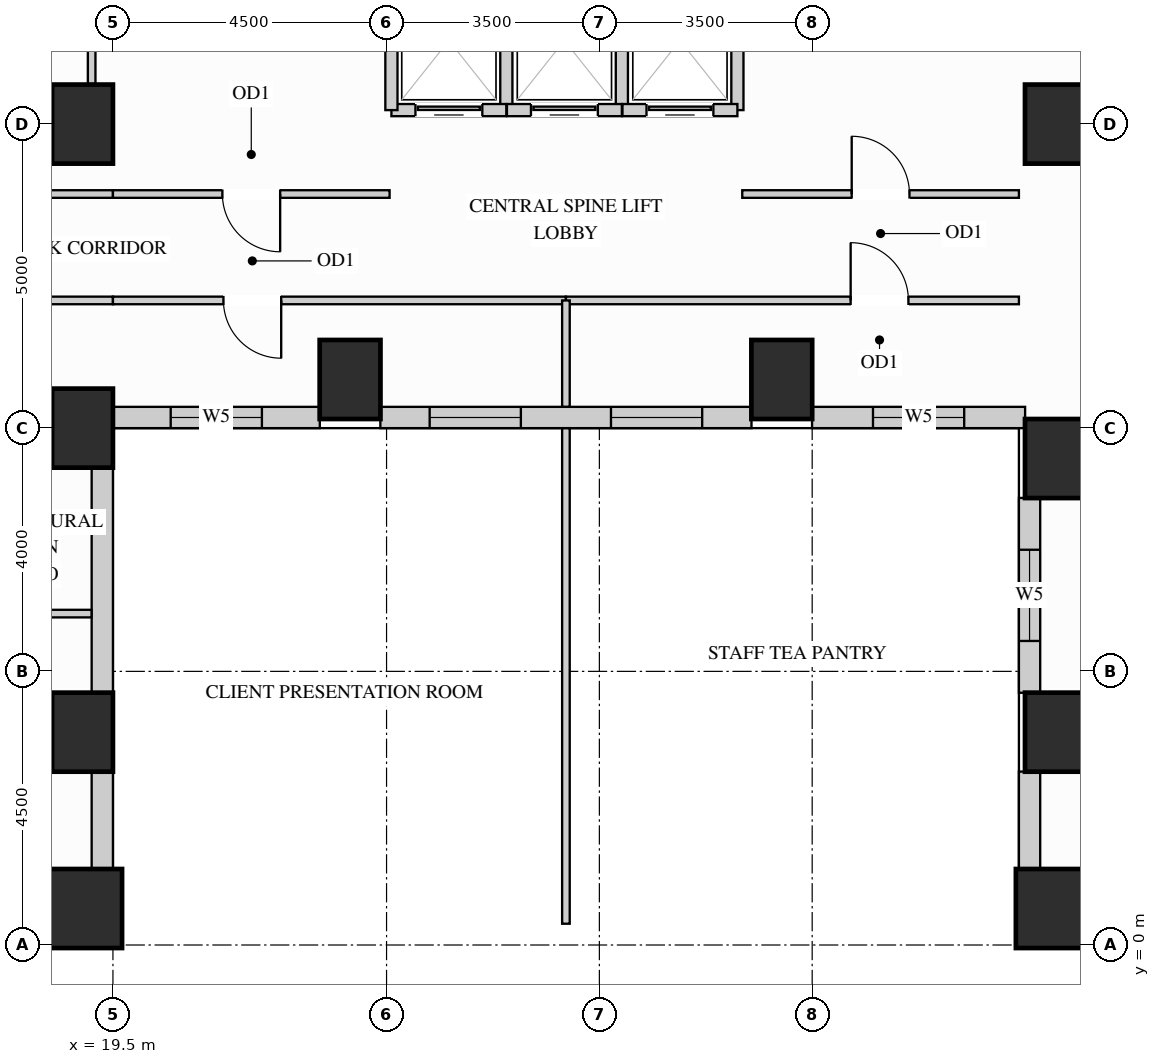
"""IFC4 building model, lengths in metres.
Left out: names, types, materials, properties, quantities, classifications, styles, units other than length and angle.
Written with IfcOpenShell. Run it as: python <this file> out.ifc"""

import sys

from ifc_helpers import new_model, si_unit, direction, frame, frame_2d, origin, origin_2d, place, context, subcontext, project, spatial, rectangle, extrude, source, transform, mapped, element, fill, save


model = new_model("IFC4")
c1 = context("Model", 3, precision=1e-05, world=origin(), true_north=direction((0.0, 1.0)))
c2 = subcontext(c1, "Body", "Model", "MODEL_VIEW")
j1 = project(units=[si_unit("LENGTHUNIT", "METRE"), si_unit("PLANEANGLEUNIT", "RADIAN")], contexts=[c1])
p1 = place(None, origin())
s1 = spatial("IfcSite", under=j1, at=p1, CompositionType="ELEMENT")
p2 = place(p1, origin())
s2 = spatial("IfcBuilding", under=s1, at=p2, CompositionType="ELEMENT")
p3 = place(p2, frame((0.0, 0.0, 26.1)))
s3 = spatial("IfcBuildingStorey", under=s2, at=p3, CompositionType="ELEMENT", Elevation=26.1)
m1 = source(origin(), c2, "Body", "SweptSolid", [
    extrude(rectangle(XDim=1.0, YDim=1.3, at=origin_2d()), origin(), (0.0, 0.0, 1.0), 3.38),
])
for number, where, z_axis, x_axis in (
    (1, (19.0, 13.5, 0.0), (0.0, 0.0, 1.0), (1.0, 0.0, 0.0)),
    (2, (19.0, 3.5, 0.0), (0.0, 0.0, 1.0), (1.0, 0.0, 0.0)),
    (3, (19.0, 8.5, 0.0), (0.0, 0.0, 1.0), (1.0, 0.0, 0.0)),
    (4, (35.0, 13.5, 0.0), (0.0, 0.0, 1.0), (1.0, 0.0, 0.0)),
    (5, (35.0, 3.5, 0.0), (0.0, 0.0, 1.0), (1.0, 0.0, 0.0)),
    (6, (35.0, 8.0, 0.0), (0.0, 0.0, 1.0), (1.0, 0.0, 0.0)),
    (7, (23.4, 9.3, 0.0), (0.0, 0.0, 1.0), (1.0, 0.0, 0.0)),
    (8, (30.5, 9.3, 0.0), (0.0, 0.0, 1.0), (1.0, 0.0, 0.0)),
):
    element("IfcColumn", number, at=place(p3, frame(where, z_axis=z_axis, x_axis=x_axis)), inside=s3, PredefinedType="COLUMN", context=c2, shape_type="MappedRepresentation", body=[
        mapped(m1, transform((0.0, 0.0, 0.0), x_axis=(1.0, 0.0, 0.0), y_axis=(0.0, 1.0, 0.0), z_axis=(0.0, 0.0, 1.0))),
    ])
m2 = source(origin(), c2, "Body", "SweptSolid", [
    extrude(rectangle(XDim=1.3, YDim=1.3, at=origin_2d()), origin(), (0.0, 0.0, 1.0), 3.38),
])
for number, where, z_axis, x_axis in (
    (9, (19.0, 0.6, 0.0), (0.0, 0.0, 1.0), (1.0, 0.0, 0.0)),
    (10, (35.0, 0.6, 0.0), (0.0, 0.0, 1.0), (1.0, 0.0, 0.0)),
):
    element("IfcColumn", number, at=place(p3, frame(where, z_axis=z_axis, x_axis=x_axis)), inside=s3, PredefinedType="COLUMN", context=c2, shape_type="MappedRepresentation", body=[
        mapped(m2, transform((0.0, 0.0, 0.0), x_axis=(1.0, 0.0, 0.0), y_axis=(0.0, 1.0, 0.0), z_axis=(0.0, 0.0, 1.0))),
    ])
m3 = source(origin(), c2, "Body", "SweptSolid", [
    extrude(rectangle(XDim=1.604, YDim=0.35, at=frame_2d((0.802, 0.0))), origin(), (0.0, 0.0, 1.0), 2.51),
])
p4 = place(p3, frame((19.325, 1.248, 0.0), z_axis=(0.0, 0.0, 1.0), x_axis=(0.0, 1.0, 0.0)))
e11 = element("IfcWall", 11, at=p4, inside=s3, PredefinedType="SOLIDWALL", context=c2, shape_type="MappedRepresentation", body=[
    mapped(m3, transform((0.0, 0.0, 0.0), x_axis=(1.0, 0.0, 0.0), y_axis=(0.0, 1.0, 0.0), z_axis=(0.0, 0.0, 1.0))),
])
m4 = source(origin(), c2, "Body", "SweptSolid", [
    extrude(rectangle(XDim=3.704, YDim=0.35, at=frame_2d((1.852, 0.0))), origin(), (0.0, 0.0, 1.0), 2.51),
])
p5 = place(p3, frame((19.325, 4.148, 0.0), z_axis=(0.0, 0.0, 1.0), x_axis=(0.0, 1.0, 0.0)))
e12 = element("IfcWall", 12, at=p5, inside=s3, PredefinedType="SOLIDWALL", context=c2, shape_type="MappedRepresentation", body=[
    mapped(m4, transform((0.0, 0.0, 0.0), x_axis=(1.0, 0.0, 0.0), y_axis=(0.0, 1.0, 0.0), z_axis=(0.0, 0.0, 1.0))),
])
p6 = place(p3, frame((19.498, 8.675, 0.0), z_axis=(0.0, 0.0, 1.0), x_axis=(1.0, 0.0, 0.0)))
e13 = element("IfcWall", 13, at=p6, inside=s3, PredefinedType="SOLIDWALL", context=c2, shape_type="SweptSolid", body=[
    extrude(rectangle(XDim=3.404, YDim=0.35, at=frame_2d((1.702, 0.0))), origin(), (0.0, 0.0, 1.0), 3.365),
])
p7 = place(p6, frame((0.952, 0.0, 0.78)))
e14 = element("IfcOpeningElement", 14, at=p7, cuts=e13, PredefinedType="OPENING", context=c2, shape_type="SweptSolid", body=[
    extrude(rectangle(XDim=1.5, YDim=2.0, at=frame_2d((0.75, 1.0))), frame((0.0, 0.185, 0.0), z_axis=(0.0, -1.0, 0.0), x_axis=(1.0, 0.0, 0.0)), (0.0, 0.0, 1.0), 0.37),
])
p8 = place(p3, frame((23.898, 8.675, 0.0), z_axis=(0.0, 0.0, 1.0), x_axis=(1.0, 0.0, 0.0)))
e15 = element("IfcWall", 15, at=p8, inside=s3, PredefinedType="SOLIDWALL", context=c2, shape_type="SweptSolid", body=[
    extrude(rectangle(XDim=6.104, YDim=0.35, at=frame_2d((3.052, 0.0))), origin(), (0.0, 0.0, 1.0), 3.365),
])
p9 = place(p8, frame((0.811, 0.0, 0.78)))
e16 = element("IfcOpeningElement", 16, at=p9, cuts=e15, PredefinedType="OPENING", context=c2, shape_type="SweptSolid", body=[
    extrude(rectangle(XDim=1.5, YDim=2.0, at=frame_2d((0.75, 1.0))), frame((0.0, 0.185, 0.0), z_axis=(0.0, -1.0, 0.0), x_axis=(1.0, 0.0, 0.0)), (0.0, 0.0, 1.0), 0.37),
])
p10 = place(p8, frame((3.793, 0.0, 0.78)))
e17 = element("IfcOpeningElement", 17, at=p10, cuts=e15, PredefinedType="OPENING", context=c2, shape_type="SweptSolid", body=[
    extrude(rectangle(XDim=1.5, YDim=2.0, at=frame_2d((0.75, 1.0))), frame((0.0, 0.185, 0.0), z_axis=(0.0, -1.0, 0.0), x_axis=(1.0, 0.0, 0.0)), (0.0, 0.0, 1.0), 0.37),
])
p11 = place(p3, frame((30.998, 8.675, 0.0), z_axis=(0.0, 0.0, 1.0), x_axis=(1.0, 0.0, 0.0)))
e18 = element("IfcWall", 18, at=p11, inside=s3, PredefinedType="SOLIDWALL", context=c2, shape_type="SweptSolid", body=[
    extrude(rectangle(XDim=3.504, YDim=0.35, at=frame_2d((1.752, 0.0))), origin(), (0.0, 0.0, 1.0), 3.365),
])
p12 = place(p11, frame((1.002, 0.0, 0.78)))
e19 = element("IfcOpeningElement", 19, at=p12, cuts=e18, PredefinedType="OPENING", context=c2, shape_type="SweptSolid", body=[
    extrude(rectangle(XDim=1.5, YDim=2.0, at=frame_2d((0.75, 1.0))), frame((0.0, 0.185, 0.0), z_axis=(0.0, -1.0, 0.0), x_axis=(1.0, 0.0, 0.0)), (0.0, 0.0, 1.0), 0.37),
])
p13 = place(p3, frame((34.575, 7.352, 0.0), z_axis=(0.0, 0.0, 1.0), x_axis=(0.0, -1.0, 0.0)))
e20 = element("IfcWall", 20, at=p13, inside=s3, PredefinedType="SOLIDWALL", context=c2, shape_type="SweptSolid", body=[
    extrude(rectangle(XDim=3.204, YDim=0.35, at=frame_2d((1.602, 0.0))), origin(), (0.0, 0.0, 1.0), 2.51),
])
p14 = place(p13, frame((0.852, 0.0, 0.78)))
e21 = element("IfcOpeningElement", 21, at=p14, cuts=e20, PredefinedType="OPENING", context=c2, shape_type="SweptSolid", body=[
    extrude(rectangle(XDim=1.5, YDim=1.55, at=frame_2d((0.75, 0.775))), frame((0.0, 0.185, 0.0), z_axis=(0.0, -1.0, 0.0), x_axis=(1.0, 0.0, 0.0)), (0.0, 0.0, 1.0), 0.37),
])
p15 = place(p3, frame((34.575, 2.852, 0.0), z_axis=(0.0, 0.0, 1.0), x_axis=(0.0, -1.0, 0.0)))
e22 = element("IfcWall", 22, at=p15, inside=s3, PredefinedType="SOLIDWALL", context=c2, shape_type="MappedRepresentation", body=[
    mapped(m3, transform((0.0, 0.0, 0.0), x_axis=(1.0, 0.0, 0.0), y_axis=(0.0, 1.0, 0.0), z_axis=(0.0, 0.0, 1.0))),
])
m5 = source(origin(), c2, "Body", "SweptSolid", [
    extrude(rectangle(XDim=3.18, YDim=0.125, at=frame_2d((1.59, 0.0))), origin(), (0.0, 0.0, 1.0), 2.67),
])
p16 = place(p3, frame((19.15, 14.16, 0.0), z_axis=(0.0, 0.0, 1.0), x_axis=(0.0, 1.0, 0.0)))
e23 = element("IfcWall", 23, at=p16, inside=s3, PredefinedType="PARTITIONING", context=c2, shape_type="MappedRepresentation", body=[
    mapped(m5, transform((0.0, 0.0, 0.0), x_axis=(1.0, 0.0, 0.0), y_axis=(0.0, 1.0, 0.0), z_axis=(0.0, 0.0, 1.0))),
])
p17 = place(p3, frame((29.85, 12.35, 0.0), z_axis=(0.0, 0.0, 1.0), x_axis=(1.0, 0.0, 0.0)))
e24 = element("IfcWall", 24, at=p17, inside=s3, PredefinedType="PARTITIONING", context=c2, shape_type="SweptSolid", body=[
    extrude(rectangle(XDim=4.55, YDim=0.125, at=frame_2d((2.275, 0.0))), origin(), (0.0, 0.0, 1.0), 3.365),
])
p18 = place(p17, frame((1.8, 0.0, 0.0)))
e25 = element("IfcOpeningElement", 25, at=p18, cuts=e24, PredefinedType="OPENING", context=c2, shape_type="SweptSolid", body=[
    extrude(rectangle(XDim=0.95, YDim=2.15, at=frame_2d((0.475, 1.075))), frame((0.0, 0.073, 0.0), z_axis=(0.0, -1.0, 0.0), x_axis=(1.0, 0.0, 0.0)), (0.0, 0.0, 1.0), 0.145),
])
m6 = source(origin(), c2, "Body", "SweptSolid", [
    extrude(rectangle(XDim=2.45, YDim=0.125, at=frame_2d((1.225, 0.0))), origin(), (0.0, 0.0, 1.0), 3.365),
])
p19 = place(p3, frame((17.05, 12.35, 0.0), z_axis=(0.0, 0.0, 1.0), x_axis=(1.0, 0.0, 0.0)))
e26 = element("IfcWall", 26, at=p19, inside=s3, PredefinedType="PARTITIONING", context=c2, shape_type="MappedRepresentation", body=[
    mapped(m6, transform((0.0, 0.0, 0.0), x_axis=(1.0, 0.0, 0.0), y_axis=(0.0, 1.0, 0.0), z_axis=(0.0, 0.0, 1.0))),
])
p20 = place(p3, frame((19.5, 12.35, 0.0), z_axis=(0.0, 0.0, 1.0), x_axis=(1.0, 0.0, 0.0)))
e27 = element("IfcWall", 27, at=p20, inside=s3, PredefinedType="PARTITIONING", context=c2, shape_type="SweptSolid", body=[
    extrude(rectangle(XDim=4.55, YDim=0.125, at=frame_2d((2.275, 0.0))), origin(), (0.0, 0.0, 1.0), 3.365),
])
p21 = place(p20, frame((1.8, 0.0, 0.0)))
e28 = element("IfcOpeningElement", 28, at=p21, cuts=e27, PredefinedType="OPENING", context=c2, shape_type="SweptSolid", body=[
    extrude(rectangle(XDim=0.95, YDim=2.15, at=frame_2d((0.475, 1.075))), frame((0.0, 0.073, 0.0), z_axis=(0.0, -1.0, 0.0), x_axis=(1.0, 0.0, 0.0)), (0.0, 0.0, 1.0), 0.145),
])
p22 = place(p3, frame((17.05, 10.6, 0.0), z_axis=(0.0, 0.0, 1.0), x_axis=(1.0, 0.0, 0.0)))
e29 = element("IfcWall", 29, at=p22, inside=s3, PredefinedType="PARTITIONING", context=c2, shape_type="MappedRepresentation", body=[
    mapped(m6, transform((0.0, 0.0, 0.0), x_axis=(1.0, 0.0, 0.0), y_axis=(0.0, 1.0, 0.0), z_axis=(0.0, 0.0, 1.0))),
])
p23 = place(p3, frame((19.5, 10.6, 0.0), z_axis=(0.0, 0.0, 1.0), x_axis=(1.0, 0.0, 0.0)))
e30 = element("IfcWall", 30, at=p23, inside=s3, PredefinedType="PARTITIONING", context=c2, shape_type="SweptSolid", body=[
    extrude(rectangle(XDim=7.45, YDim=0.125, at=frame_2d((3.725, 0.0))), origin(), (0.0, 0.0, 1.0), 3.365),
])
p24 = place(p23, frame((1.817, 0.0, 0.0)))
e31 = element("IfcOpeningElement", 31, at=p24, cuts=e30, PredefinedType="OPENING", context=c2, shape_type="SweptSolid", body=[
    extrude(rectangle(XDim=0.95, YDim=2.15, at=frame_2d((0.475, 1.075))), frame((0.0, 0.073, 0.0), z_axis=(0.0, -1.0, 0.0), x_axis=(1.0, 0.0, 0.0)), (0.0, 0.0, 1.0), 0.145),
])
p25 = place(p3, frame((26.95, 10.6, 0.0), z_axis=(0.0, 0.0, 1.0), x_axis=(1.0, 0.0, 0.0)))
e32 = element("IfcWall", 32, at=p25, inside=s3, PredefinedType="PARTITIONING", context=c2, shape_type="SweptSolid", body=[
    extrude(rectangle(XDim=7.45, YDim=0.125, at=frame_2d((3.725, 0.0))), origin(), (0.0, 0.0, 1.0), 3.365),
])
p26 = place(p25, frame((4.683, 0.0, 0.0)))
e33 = element("IfcOpeningElement", 33, at=p26, cuts=e32, PredefinedType="OPENING", context=c2, shape_type="SweptSolid", body=[
    extrude(rectangle(XDim=0.95, YDim=2.15, at=frame_2d((0.475, 1.075))), frame((0.0, 0.073, 0.0), z_axis=(0.0, -1.0, 0.0), x_axis=(1.0, 0.0, 0.0)), (0.0, 0.0, 1.0), 0.145),
])
m7 = source(origin(), c2, "Body", "SweptSolid", [
    extrude(rectangle(XDim=8.148, YDim=0.125, at=frame_2d((4.074, 0.0))), origin(), (0.0, 0.0, 1.0), 3.365),
])
p27 = place(p3, frame((26.95, 0.35, 0.0), z_axis=(0.0, 0.0, 1.0), x_axis=(0.0, 1.0, 0.0)))
e34 = element("IfcWall", 34, at=p27, inside=s3, PredefinedType="PARTITIONING", context=c2, shape_type="MappedRepresentation", body=[
    mapped(m7, transform((0.0, 0.0, 0.0), x_axis=(1.0, 0.0, 0.0), y_axis=(0.0, 1.0, 0.0), z_axis=(0.0, 0.0, 1.0))),
])
m8 = source(origin(), c2, "Body", "SweptSolid", [
    extrude(rectangle(XDim=1.748, YDim=0.125, at=frame_2d((0.874, 0.0))), origin(), (0.0, 0.0, 1.0), 3.365),
])
p28 = place(p3, frame((26.95, 8.852, 0.0), z_axis=(0.0, 0.0, 1.0), x_axis=(0.0, 1.0, 0.0)))
e35 = element("IfcWall", 35, at=p28, inside=s3, PredefinedType="PARTITIONING", context=c2, shape_type="MappedRepresentation", body=[
    mapped(m8, transform((0.0, 0.0, 0.0), x_axis=(1.0, 0.0, 0.0), y_axis=(0.0, 1.0, 0.0), z_axis=(0.0, 0.0, 1.0))),
])
m9 = source(origin(), c2, "Body", "SweptSolid", [
    extrude(rectangle(XDim=2.098, YDim=0.125, at=frame_2d((1.049, 0.0))), origin(), (0.0, 0.0, 1.0), 3.365),
])
p29 = place(p3, frame((17.05, 5.45, 0.0), z_axis=(0.0, 0.0, 1.0), x_axis=(1.0, 0.0, 0.0)))
e36 = element("IfcWall", 36, at=p29, inside=s3, PredefinedType="PARTITIONING", context=c2, shape_type="MappedRepresentation", body=[
    mapped(m9, transform((0.0, 0.0, 0.0), x_axis=(1.0, 0.0, 0.0), y_axis=(0.0, 1.0, 0.0), z_axis=(0.0, 0.0, 1.0))),
])
m10 = source(origin(), c2, "Body", "SweptSolid", [
    extrude(rectangle(XDim=2.29, YDim=0.2, at=frame_2d((1.145, 0.0))), origin(), (0.0, 0.0, 1.0), 3.365),
])
p30 = place(p3, frame((25.97, 13.73, 0.0), z_axis=(0.0, 0.0, 1.0), x_axis=(0.0, 1.0, 0.0)))
e37 = element("IfcWall", 37, at=p30, inside=s3, PredefinedType="PARTITIONING", context=c2, shape_type="MappedRepresentation", body=[
    mapped(m10, transform((0.0, 0.0, 0.0), x_axis=(1.0, 0.0, 0.0), y_axis=(0.0, 1.0, 0.0), z_axis=(0.0, 0.0, 1.0))),
])
p31 = place(p3, frame((24.08, 13.73, 0.0), z_axis=(0.0, 0.0, 1.0), x_axis=(1.0, 0.0, 0.0)))
e38 = element("IfcWall", 38, at=p31, inside=s3, PredefinedType="PARTITIONING", context=c2, shape_type="SweptSolid", body=[
    extrude(rectangle(XDim=1.89, YDim=0.2, at=frame_2d((0.945, 0.0))), origin(), (0.0, 0.0, 1.0), 2.446),
])
p32 = place(p31, frame((0.395, 0.0, 0.0)))
e39 = element("IfcOpeningElement", 39, at=p32, cuts=e38, PredefinedType="OPENING", context=c2, shape_type="SweptSolid", body=[
    extrude(rectangle(XDim=1.1, YDim=2.2, at=frame_2d((0.55, 1.1))), frame((0.0, 0.11, 0.0), z_axis=(0.0, -1.0, 0.0), x_axis=(1.0, 0.0, 0.0)), (0.0, 0.0, 1.0), 0.22),
])
for number, where, z_axis, x_axis in (
    (40, (24.08, 13.73, 0.0), (0.0, 0.0, 1.0), (0.0, 1.0, 0.0)),
    (41, (27.87, 13.73, 0.0), (0.0, 0.0, 1.0), (0.0, 1.0, 0.0)),
):
    element("IfcWall", number, at=place(p3, frame(where, z_axis=z_axis, x_axis=x_axis)), inside=s3, PredefinedType="PARTITIONING", context=c2, shape_type="MappedRepresentation", body=[
        mapped(m10, transform((0.0, 0.0, 0.0), x_axis=(1.0, 0.0, 0.0), y_axis=(0.0, 1.0, 0.0), z_axis=(0.0, 0.0, 1.0))),
    ])
p33 = place(p3, frame((25.98, 13.73, 0.0), z_axis=(0.0, 0.0, 1.0), x_axis=(1.0, 0.0, 0.0)))
e42 = element("IfcWall", 42, at=p33, inside=s3, PredefinedType="PARTITIONING", context=c2, shape_type="SweptSolid", body=[
    extrude(rectangle(XDim=1.89, YDim=0.2, at=frame_2d((0.945, 0.0))), origin(), (0.0, 0.0, 1.0), 2.446),
])
p34 = place(p33, frame((0.395, 0.0, 0.0)))
e43 = element("IfcOpeningElement", 43, at=p34, cuts=e42, PredefinedType="OPENING", context=c2, shape_type="SweptSolid", body=[
    extrude(rectangle(XDim=1.1, YDim=2.2, at=frame_2d((0.55, 1.1))), frame((0.0, 0.11, 0.0), z_axis=(0.0, -1.0, 0.0), x_axis=(1.0, 0.0, 0.0)), (0.0, 0.0, 1.0), 0.22),
])
p35 = place(p3, frame((29.77, 13.73, 0.0), z_axis=(0.0, 0.0, 1.0), x_axis=(0.0, 1.0, 0.0)))
e44 = element("IfcWall", 44, at=p35, inside=s3, PredefinedType="PARTITIONING", context=c2, shape_type="MappedRepresentation", body=[
    mapped(m10, transform((0.0, 0.0, 0.0), x_axis=(1.0, 0.0, 0.0), y_axis=(0.0, 1.0, 0.0), z_axis=(0.0, 0.0, 1.0))),
])
p36 = place(p3, frame((27.88, 13.73, 0.0), z_axis=(0.0, 0.0, 1.0), x_axis=(1.0, 0.0, 0.0)))
e45 = element("IfcWall", 45, at=p36, inside=s3, PredefinedType="PARTITIONING", context=c2, shape_type="SweptSolid", body=[
    extrude(rectangle(XDim=1.89, YDim=0.2, at=frame_2d((0.945, 0.0))), origin(), (0.0, 0.0, 1.0), 2.446),
])
p37 = place(p36, frame((0.395, 0.0, 0.0)))
e46 = element("IfcOpeningElement", 46, at=p37, cuts=e45, PredefinedType="OPENING", context=c2, shape_type="SweptSolid", body=[
    extrude(rectangle(XDim=1.1, YDim=2.2, at=frame_2d((0.55, 1.1))), frame((0.0, 0.11, 0.0), z_axis=(0.0, -1.0, 0.0), x_axis=(1.0, 0.0, 0.0)), (0.0, 0.0, 1.0), 0.22),
])
m11 = source(origin(), c2, "Body", "SweptSolid", [
    extrude(rectangle(XDim=1.1, YDim=2.2, at=frame_2d((0.55, 1.1))), frame((0.0, 0.025, 0.0), z_axis=(0.0, -1.0, 0.0), x_axis=(1.0, 0.0, 0.0)), (0.0, 0.0, 1.0), 0.05),
])
p38 = place(p32, origin())
e47 = element("IfcDoor", 47, at=p38, inside=s3, OperationType="SLIDING_TO_LEFT", PredefinedType="DOOR", context=c2, shape_type="MappedRepresentation", body=[
    mapped(m11, transform((0.0, 0.0, 0.0), x_axis=(1.0, 0.0, 0.0), y_axis=(0.0, 1.0, 0.0), z_axis=(0.0, 0.0, 1.0))),
])
fill(e39, e47)
p39 = place(p34, origin())
e48 = element("IfcDoor", 48, at=p39, inside=s3, OperationType="SLIDING_TO_LEFT", PredefinedType="DOOR", context=c2, shape_type="MappedRepresentation", body=[
    mapped(m11, transform((0.0, 0.0, 0.0), x_axis=(1.0, 0.0, 0.0), y_axis=(0.0, 1.0, 0.0), z_axis=(0.0, 0.0, 1.0))),
])
fill(e43, e48)
p40 = place(p37, origin())
e49 = element("IfcDoor", 49, at=p40, inside=s3, OperationType="SLIDING_TO_LEFT", PredefinedType="DOOR", context=c2, shape_type="MappedRepresentation", body=[
    mapped(m11, transform((0.0, 0.0, 0.0), x_axis=(1.0, 0.0, 0.0), y_axis=(0.0, 1.0, 0.0), z_axis=(0.0, 0.0, 1.0))),
])
fill(e46, e49)
m12 = source(origin(), c2, "Body", "SweptSolid", [
    extrude(rectangle(XDim=0.95, YDim=2.15, at=frame_2d((0.475, 1.075))), frame((0.0, 0.025, 0.0), z_axis=(0.0, -1.0, 0.0), x_axis=(1.0, 0.0, 0.0)), (0.0, 0.0, 1.0), 0.05),
])
p41 = place(p21, origin())
e50 = element("IfcDoor", 50, at=p41, inside=s3, OperationType="SINGLE_SWING_RIGHT", PredefinedType="DOOR", context=c2, shape_type="MappedRepresentation", body=[
    mapped(m12, transform((0.0, 0.0, 0.0), x_axis=(1.0, 0.0, 0.0), y_axis=(0.0, 1.0, 0.0), z_axis=(0.0, 0.0, 1.0))),
])
fill(e28, e50)
p42 = place(p18, origin())
e51 = element("IfcDoor", 51, at=p42, inside=s3, OperationType="SINGLE_SWING_LEFT", PredefinedType="DOOR", context=c2, shape_type="MappedRepresentation", body=[
    mapped(m12, transform((0.0, 0.0, 0.0), x_axis=(1.0, 0.0, 0.0), y_axis=(0.0, 1.0, 0.0), z_axis=(0.0, 0.0, 1.0))),
])
fill(e25, e51)
p43 = place(p24, origin())
e52 = element("IfcDoor", 52, at=p43, inside=s3, OperationType="SINGLE_SWING_RIGHT", PredefinedType="DOOR", context=c2, shape_type="MappedRepresentation", body=[
    mapped(m12, transform((0.0, 0.0, 0.0), x_axis=(1.0, 0.0, 0.0), y_axis=(0.0, 1.0, 0.0), z_axis=(0.0, 0.0, 1.0))),
])
fill(e31, e52)
p44 = place(p26, origin())
e53 = element("IfcDoor", 53, at=p44, inside=s3, OperationType="SINGLE_SWING_LEFT", PredefinedType="DOOR", context=c2, shape_type="MappedRepresentation", body=[
    mapped(m12, transform((0.0, 0.0, 0.0), x_axis=(1.0, 0.0, 0.0), y_axis=(0.0, 1.0, 0.0), z_axis=(0.0, 0.0, 1.0))),
])
fill(e33, e53)
m13 = source(origin(), c2, "Body", "SweptSolid", [
    extrude(rectangle(XDim=1.5, YDim=2.0, at=frame_2d((0.75, 1.0))), frame((0.0, 0.03, 0.0), z_axis=(0.0, -1.0, 0.0), x_axis=(1.0, 0.0, 0.0)), (0.0, 0.0, 1.0), 0.06),
])
p45 = place(p7, origin())
e54 = element("IfcWindow", 54, at=p45, inside=s3, PartitioningType="SINGLE_PANEL", PredefinedType="WINDOW", context=c2, shape_type="MappedRepresentation", body=[
    mapped(m13, transform((0.0, 0.0, 0.0), x_axis=(1.0, 0.0, 0.0), y_axis=(0.0, 1.0, 0.0), z_axis=(0.0, 0.0, 1.0))),
])
fill(e14, e54)
p46 = place(p9, origin())
e55 = element("IfcWindow", 55, at=p46, inside=s3, PartitioningType="SINGLE_PANEL", PredefinedType="WINDOW", context=c2, shape_type="MappedRepresentation", body=[
    mapped(m13, transform((0.0, 0.0, 0.0), x_axis=(1.0, 0.0, 0.0), y_axis=(0.0, 1.0, 0.0), z_axis=(0.0, 0.0, 1.0))),
])
fill(e16, e55)
p47 = place(p10, origin())
e56 = element("IfcWindow", 56, at=p47, inside=s3, PartitioningType="SINGLE_PANEL", PredefinedType="WINDOW", context=c2, shape_type="MappedRepresentation", body=[
    mapped(m13, transform((0.0, 0.0, 0.0), x_axis=(1.0, 0.0, 0.0), y_axis=(0.0, 1.0, 0.0), z_axis=(0.0, 0.0, 1.0))),
])
fill(e17, e56)
p48 = place(p12, origin())
e57 = element("IfcWindow", 57, at=p48, inside=s3, PartitioningType="SINGLE_PANEL", PredefinedType="WINDOW", context=c2, shape_type="MappedRepresentation", body=[
    mapped(m13, transform((0.0, 0.0, 0.0), x_axis=(1.0, 0.0, 0.0), y_axis=(0.0, 1.0, 0.0), z_axis=(0.0, 0.0, 1.0))),
])
fill(e19, e57)
m14 = source(origin(), c2, "Body", "SweptSolid", [
    extrude(rectangle(XDim=1.5, YDim=1.55, at=frame_2d((0.75, 0.775))), frame((0.0, 0.03, 0.0), z_axis=(0.0, -1.0, 0.0), x_axis=(1.0, 0.0, 0.0)), (0.0, 0.0, 1.0), 0.06),
])
p49 = place(p14, origin())
e58 = element("IfcWindow", 58, at=p49, inside=s3, PartitioningType="SINGLE_PANEL", PredefinedType="WINDOW", context=c2, shape_type="MappedRepresentation", body=[
    mapped(m14, transform((0.0, 0.0, 0.0), x_axis=(1.0, 0.0, 0.0), y_axis=(0.0, 1.0, 0.0), z_axis=(0.0, 0.0, 1.0))),
])
fill(e21, e58)
save(model, sys.argv[1])
